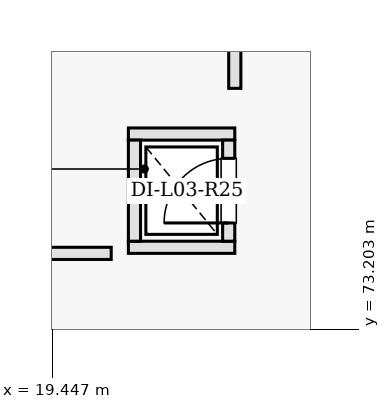
"""IFC4 building model, lengths in metres.
Left out: names, types, materials, properties, quantities, classifications, styles, units other than length and angle.
Written with IfcOpenShell. Run it as: python <this file> out.ifc"""

import sys

from ifc_helpers import new_model, si_unit, direction, frame, frame_2d, origin, place, context, subcontext, project, spatial, rectangle, extrude, element, fill, save


model = new_model("IFC4")
c1 = context("Model", 3, precision=1e-05, world=origin(), true_north=direction((0.0, 1.0)))
c2 = subcontext(c1, "Body", "Model", "MODEL_VIEW")
j1 = project(units=[si_unit("LENGTHUNIT", "METRE"), si_unit("PLANEANGLEUNIT", "RADIAN")], contexts=[c1])
p1 = place(None, origin())
s1 = spatial("IfcSite", under=j1, at=p1, CompositionType="ELEMENT")
p2 = place(p1, origin())
s2 = spatial("IfcBuilding", under=s1, at=p2, CompositionType="ELEMENT")
p3 = place(p2, frame((0.0, 0.0, 13.8)))
s3 = spatial("IfcBuildingStorey", under=s2, at=p3, CompositionType="ELEMENT", Elevation=13.8)
for number, where, z_axis, x_axis in (
    (1, (20.45, 74.28, 0.0), (0.0, 0.0, 1.0), (1.0, 0.0, 0.0)),
    (2, (20.45, 75.77, 0.0), (0.0, 0.0, 1.0), (1.0, 0.0, 0.0)),
):
    element("IfcWall", number, at=place(p3, frame(where, z_axis=z_axis, x_axis=x_axis)), inside=s3, PredefinedType="PARTITIONING", context=c2, shape_type="SweptSolid", body=[
        extrude(rectangle(XDim=1.4, YDim=0.16, at=frame_2d((0.7, 0.0))), origin(), (0.0, 0.0, 1.0), 3.98),
    ])
p4 = place(p3, frame((20.53, 74.36, 0.0), z_axis=(0.0, 0.0, 1.0), x_axis=(0.0, 1.0, 0.0)))
e3 = element("IfcWall", 3, at=p4, inside=s3, PredefinedType="PARTITIONING", context=c2, shape_type="SweptSolid", body=[
    extrude(rectangle(XDim=1.33, YDim=0.16, at=frame_2d((0.665, 0.0))), origin(), (0.0, 0.0, 1.0), 3.98),
])
p5 = place(p3, frame((21.77, 74.36, 0.0), z_axis=(0.0, 0.0, 1.0), x_axis=(0.0, 1.0, 0.0)))
e4 = element("IfcWall", 4, at=p5, inside=s3, PredefinedType="PARTITIONING", context=c2, shape_type="SweptSolid", body=[
    extrude(rectangle(XDim=1.33, YDim=0.16, at=frame_2d((0.665, 0.0))), origin(), (0.0, 0.0, 1.0), 3.98),
])
p6 = place(p5, frame((0.24, 0.0, 0.0)))
e5 = element("IfcOpeningElement", 5, at=p6, cuts=e4, PredefinedType="OPENING", context=c2, shape_type="SweptSolid", body=[
    extrude(rectangle(XDim=0.85, YDim=2.02, at=frame_2d((0.425, 1.01))), frame((0.0, 0.09, 0.0), z_axis=(0.0, -1.0, 0.0), x_axis=(1.0, 0.0, 0.0)), (0.0, 0.0, 1.0), 0.18),
])
p7 = place(p3, frame((17.37, 74.2, 0.0), z_axis=(0.0, 0.0, 1.0), x_axis=(1.0, 0.0, 0.0)))
e6 = element("IfcWall", 6, at=p7, inside=s3, PredefinedType="PARTITIONING", context=c2, shape_type="SweptSolid", body=[
    extrude(rectangle(XDim=2.854, YDim=0.16, at=frame_2d((1.427, 0.0))), origin(), (0.0, 0.0, 1.0), 3.96),
])
p8 = place(p3, frame((21.85, 76.371, 0.0), z_axis=(0.0, 0.0, 1.0), x_axis=(0.0, 1.0, 0.0)))
e7 = element("IfcWall", 7, at=p8, inside=s3, PredefinedType="PARTITIONING", context=c2, shape_type="SweptSolid", body=[
    extrude(rectangle(XDim=3.839, YDim=0.16, at=frame_2d((1.919, 0.0))), origin(), (0.0, 0.0, 1.0), 3.485),
])
p9 = place(p6, origin())
e8 = element("IfcDoor", 8, at=p9, inside=s3, OperationType="SINGLE_SWING_LEFT", PredefinedType="DOOR", context=c2, shape_type="SweptSolid", body=[
    extrude(rectangle(XDim=0.85, YDim=2.02, at=frame_2d((0.425, 1.01))), frame((0.0, 0.025, 0.0), z_axis=(0.0, -1.0, 0.0), x_axis=(1.0, 0.0, 0.0)), (0.0, 0.0, 1.0), 0.05),
])
fill(e5, e8)
save(model, sys.argv[1])
